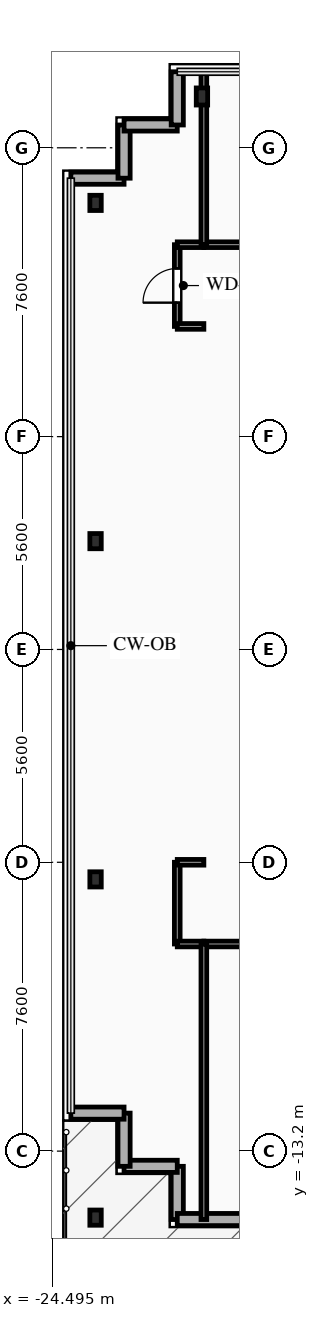
"""IFC4 building model, lengths in metres.
Left out: names, types, materials, properties, quantities, classifications, styles, units other than length and angle.
Written with IfcOpenShell. Run it as: python <this file> out.ifc"""

import sys

from ifc_helpers import new_model, si_unit, direction, frame, frame_2d, origin, origin_2d, place, context, subcontext, project, spatial, rectangle, i_section, extrude, element, fill, save


model = new_model("IFC4")
c1 = context("Model", 3, precision=1e-05, world=origin(), true_north=direction((0.0, 1.0)))
c2 = subcontext(c1, "Body", "Model", "MODEL_VIEW")
j1 = project(units=[si_unit("LENGTHUNIT", "METRE"), si_unit("PLANEANGLEUNIT", "RADIAN")], contexts=[c1])
p1 = place(None, origin())
s1 = spatial("IfcSite", under=j1, at=p1, CompositionType="ELEMENT")
p2 = place(p1, origin())
s2 = spatial("IfcBuilding", under=s1, at=p2, CompositionType="ELEMENT")
p3 = place(p2, frame((0.0, 0.0, 261.8)))
s3 = spatial("IfcBuildingStorey", under=s2, at=p3, CompositionType="ELEMENT", Elevation=261.8)
p4 = place(p3, frame((-20.55, 14.55, 0.0), z_axis=(0.0, 0.0, 1.0), x_axis=(1.0, 0.0, 0.0)))
e1 = element("IfcColumn", 1, at=p4, inside=s3, PredefinedType="COLUMN", context=c2, shape_type="SweptSolid", body=[
    extrude(i_section(OverallWidth=0.3, OverallDepth=0.45, WebThickness=0.014, FlangeThickness=0.026, FilletRadius=0.027, at=origin_2d()), origin(), (0.0, 0.0, 1.0), 4.2),
])
for number, where, z_axis, x_axis in (
    (2, (-23.35, 11.75, 0.0), (0.0, 0.0, 1.0), (1.0, 0.0, 0.0)),
    (3, (-23.35, 2.85, 0.0), (0.0, 0.0, 1.0), (1.0, 0.0, 0.0)),
    (4, (-23.35, -6.05, 0.0), (0.0, 0.0, 1.0), (1.0, 0.0, 0.0)),
    (5, (-23.35, -14.95, 0.0), (0.0, 0.0, 1.0), (1.0, 0.0, 0.0)),
):
    element("IfcColumn", number, at=place(p3, frame(where, z_axis=z_axis, x_axis=x_axis)), inside=s3, PredefinedType="COLUMN", context=c2, shape_type="SweptSolid", body=[
        extrude(i_section(OverallWidth=0.3, OverallDepth=0.4, WebThickness=0.013, FlangeThickness=0.024, FilletRadius=0.027, at=origin_2d()), origin(), (0.0, 0.0, 1.0), 4.2),
    ])
p5 = place(p3, frame((-21.2, -15.0, 0.0), z_axis=(0.0, 0.0, 1.0), x_axis=(0.0, 1.0, 0.0)))
e6 = element("IfcWall", 6, at=p5, inside=s3, PredefinedType="SOLIDWALL", context=c2, shape_type="SweptSolid", body=[
    extrude(rectangle(XDim=1.4, YDim=0.32, at=frame_2d((0.7, 0.0))), origin(), (0.0, 0.0, 1.0), 3.78),
])
for number, where, z_axis, x_axis in (
    (7, (-21.2, -13.6, 0.0), (0.0, 0.0, 1.0), (-1.0, 0.0, 0.0)),
    (8, (-22.6, -13.6, 0.0), (0.0, 0.0, 1.0), (0.0, 1.0, 0.0)),
):
    element("IfcWall", number, at=place(p3, frame(where, z_axis=z_axis, x_axis=x_axis)), inside=s3, PredefinedType="SOLIDWALL", context=c2, shape_type="SweptSolid", body=[
        extrude(rectangle(XDim=1.4, YDim=0.32, at=frame_2d((0.7, 0.0))), origin(), (0.0, 0.0, 1.0), 3.78),
    ])
for number, where, z_axis, x_axis in (
    (9, (-22.6, -12.2, 0.0), (0.0, 0.0, 1.0), (-1.0, 0.0, 0.0)),
    (10, (-24.0, 12.4, 0.0), (0.0, 0.0, 1.0), (1.0, 0.0, 0.0)),
):
    element("IfcWall", number, at=place(p3, frame(where, z_axis=z_axis, x_axis=x_axis)), inside=s3, PredefinedType="SOLIDWALL", context=c2, shape_type="SweptSolid", body=[
        extrude(rectangle(XDim=1.4, YDim=0.32, at=frame_2d((0.7, 0.0))), origin(), (0.0, 0.0, 1.0), 3.78),
    ])
for number, where, z_axis, x_axis in (
    (11, (-22.6, 12.4, 0.0), (0.0, 0.0, 1.0), (0.0, 1.0, 0.0)),
    (12, (-22.6, 13.8, 0.0), (0.0, 0.0, 1.0), (1.0, 0.0, 0.0)),
):
    element("IfcWall", number, at=place(p3, frame(where, z_axis=z_axis, x_axis=x_axis)), inside=s3, PredefinedType="SOLIDWALL", context=c2, shape_type="SweptSolid", body=[
        extrude(rectangle(XDim=1.4, YDim=0.32, at=frame_2d((0.7, 0.0))), origin(), (0.0, 0.0, 1.0), 3.78),
    ])
p6 = place(p3, frame((-21.2, 13.8, 0.0), z_axis=(0.0, 0.0, 1.0), x_axis=(0.0, 1.0, 0.0)))
e13 = element("IfcWall", 13, at=p6, inside=s3, PredefinedType="SOLIDWALL", context=c2, shape_type="SweptSolid", body=[
    extrude(rectangle(XDim=1.4, YDim=0.32, at=frame_2d((0.7, 0.0))), origin(), (0.0, 0.0, 1.0), 3.78),
])
p7 = place(p3, frame((20.8, -15.0, 0.0), z_axis=(0.0, 0.0, 1.0), x_axis=(-1.0, 0.0, 0.0)))
e14 = element("IfcWall", 14, at=p7, inside=s3, PredefinedType="SOLIDWALL", context=c2, shape_type="SweptSolid", body=[
    extrude(rectangle(XDim=42.0, YDim=0.32, at=frame_2d((21.0, 0.0))), origin(), (0.0, 0.0, 1.0), 3.78),
])
p8 = place(p7, frame((0.75, 0.0, 0.0)))
e15 = element("IfcOpeningElement", 15, at=p8, cuts=e14, PredefinedType="OPENING", context=c2, shape_type="SweptSolid", body=[
    extrude(rectangle(XDim=1.5, YDim=2.2, at=frame_2d((0.75, 1.1))), frame((0.0, 0.17, 0.0), z_axis=(0.0, -1.0, 0.0), x_axis=(1.0, 0.0, 0.0)), (0.0, 0.0, 1.0), 0.34),
])
p9 = place(p7, frame((4.11, 0.0, 0.75)))
e16 = element("IfcOpeningElement", 16, at=p9, cuts=e14, PredefinedType="OPENING", context=c2, shape_type="SweptSolid", body=[
    extrude(rectangle(XDim=2.1, YDim=2.3, at=frame_2d((1.05, 1.15))), frame((0.0, 0.17, 0.0), z_axis=(0.0, -1.0, 0.0), x_axis=(1.0, 0.0, 0.0)), (0.0, 0.0, 1.0), 0.34),
])
p10 = place(p7, frame((19.79, 0.0, 0.75)))
e17 = element("IfcOpeningElement", 17, at=p10, cuts=e14, PredefinedType="OPENING", context=c2, shape_type="SweptSolid", body=[
    extrude(rectangle(XDim=2.1, YDim=2.3, at=frame_2d((1.05, 1.15))), frame((0.0, 0.17, 0.0), z_axis=(0.0, -1.0, 0.0), x_axis=(1.0, 0.0, 0.0)), (0.0, 0.0, 1.0), 0.34),
])
p11 = place(p7, frame((35.55, 0.0, 0.75)))
e18 = element("IfcOpeningElement", 18, at=p11, cuts=e14, PredefinedType="OPENING", context=c2, shape_type="SweptSolid", body=[
    extrude(rectangle(XDim=2.1, YDim=2.3, at=frame_2d((1.05, 1.15))), frame((0.0, 0.17, 0.0), z_axis=(0.0, -1.0, 0.0), x_axis=(1.0, 0.0, 0.0)), (0.0, 0.0, 1.0), 0.34),
])
p12 = place(p3, frame((-21.2, 8.5, 0.0), z_axis=(0.0, 0.0, 1.0), x_axis=(0.0, 1.0, 0.0)))
e19 = element("IfcWall", 19, at=p12, inside=s3, PredefinedType="PARTITIONING", context=c2, shape_type="SweptSolid", body=[
    extrude(rectangle(XDim=2.15, YDim=0.15, at=frame_2d((1.075, 0.0))), origin(), (0.0, 0.0, 1.0), 3.435),
])
p13 = place(p12, frame((0.625, 0.0, 0.0)))
e20 = element("IfcOpeningElement", 20, at=p13, cuts=e19, PredefinedType="OPENING", context=c2, shape_type="SweptSolid", body=[
    extrude(rectangle(XDim=0.9, YDim=2.1, at=frame_2d((0.45, 1.05))), frame((0.0, 0.085, 0.0), z_axis=(0.0, -1.0, 0.0), x_axis=(1.0, 0.0, 0.0)), (0.0, 0.0, 1.0), 0.17),
])
for number, where, z_axis, x_axis in (
    (21, (-20.5, 8.5, 0.0), (0.0, 0.0, 1.0), (-1.0, 0.0, 0.0)),
    (22, (-21.2, 10.65, 0.0), (0.0, 0.0, 1.0), (1.0, 0.0, 0.0)),
):
    element("IfcWall", number, at=place(p3, frame(where, z_axis=z_axis, x_axis=x_axis)), inside=s3, PredefinedType="PARTITIONING", context=c2, shape_type="SweptSolid", body=[
        extrude(rectangle(XDim=0.7, YDim=0.15, at=frame_2d((0.35, 0.0))), origin(), (0.0, 0.0, 1.0), 3.78),
    ])
p14 = place(p3, frame((-20.5, 10.65, 0.0), z_axis=(0.0, 0.0, 1.0), x_axis=(1.0, 0.0, 0.0)))
e23 = element("IfcWall", 23, at=p14, inside=s3, PredefinedType="PARTITIONING", context=c2, shape_type="SweptSolid", body=[
    extrude(rectangle(XDim=20.5, YDim=0.15, at=frame_2d((10.25, 0.0))), origin(), (0.0, 0.0, 1.0), 3.78),
])
p15 = place(p14, frame((16.584, 0.0, 0.0)))
e24 = element("IfcOpeningElement", 24, at=p15, cuts=e23, PredefinedType="OPENING", context=c2, shape_type="SweptSolid", body=[
    extrude(rectangle(XDim=1.05, YDim=2.15, at=frame_2d((0.525, 1.075))), frame((0.0, 0.085, 0.0), z_axis=(0.0, -1.0, 0.0), x_axis=(1.0, 0.0, 0.0)), (0.0, 0.0, 1.0), 0.17),
])
p16 = place(p3, frame((-11.0, -7.75, 0.0), z_axis=(0.0, 0.0, 1.0), x_axis=(-1.0, 0.0, 0.0)))
e25 = element("IfcWall", 25, at=p16, inside=s3, PredefinedType="PARTITIONING", context=c2, shape_type="SweptSolid", body=[
    extrude(rectangle(XDim=9.5, YDim=0.15, at=frame_2d((4.75, 0.0))), origin(), (0.0, 0.0, 1.0), 3.78),
])
p17 = place(p16, frame((2.403, 0.0, 0.0)))
e26 = element("IfcOpeningElement", 26, at=p17, cuts=e25, PredefinedType="OPENING", context=c2, shape_type="SweptSolid", body=[
    extrude(rectangle(XDim=1.05, YDim=2.15, at=frame_2d((0.525, 1.075))), frame((0.0, 0.085, 0.0), z_axis=(0.0, -1.0, 0.0), x_axis=(1.0, 0.0, 0.0)), (0.0, 0.0, 1.0), 0.17),
])
p18 = place(p3, frame((-21.2, -7.75, 0.0), z_axis=(0.0, 0.0, 1.0), x_axis=(0.0, 1.0, 0.0)))
e27 = element("IfcWall", 27, at=p18, inside=s3, PredefinedType="PARTITIONING", context=c2, shape_type="SweptSolid", body=[
    extrude(rectangle(XDim=2.15, YDim=0.15, at=frame_2d((1.075, 0.0))), origin(), (0.0, 0.0, 1.0), 3.435),
])
for number, where, z_axis, x_axis in (
    (28, (-20.5, -7.75, 0.0), (0.0, 0.0, 1.0), (-1.0, 0.0, 0.0)),
    (29, (-21.2, -5.6, 0.0), (0.0, 0.0, 1.0), (1.0, 0.0, 0.0)),
):
    element("IfcWall", number, at=place(p3, frame(where, z_axis=z_axis, x_axis=x_axis)), inside=s3, PredefinedType="PARTITIONING", context=c2, shape_type="SweptSolid", body=[
        extrude(rectangle(XDim=0.7, YDim=0.15, at=frame_2d((0.35, 0.0))), origin(), (0.0, 0.0, 1.0), 3.78),
    ])
p19 = place(p3, frame((-20.5, -15.0, 0.0), z_axis=(0.0, 0.0, 1.0), x_axis=(0.0, 1.0, 0.0)))
e30 = element("IfcWall", 30, at=p19, inside=s3, PredefinedType="PARTITIONING", context=c2, shape_type="SweptSolid", body=[
    extrude(rectangle(XDim=7.25, YDim=0.15, at=frame_2d((3.625, 0.0))), origin(), (0.0, 0.0, 1.0), 3.78),
])
p20 = place(p3, frame((-20.5, 15.2, 0.0), z_axis=(0.0, 0.0, 1.0), x_axis=(0.0, -1.0, 0.0)))
e31 = element("IfcWall", 31, at=p20, inside=s3, PredefinedType="PARTITIONING", context=c2, shape_type="SweptSolid", body=[
    extrude(rectangle(XDim=4.55, YDim=0.15, at=frame_2d((2.275, 0.0))), origin(), (0.0, 0.0, 1.0), 3.405),
])
p21 = place(p13, origin())
e32 = element("IfcDoor", 32, at=p21, inside=s3, OperationType="SINGLE_SWING_LEFT", PredefinedType="DOOR", context=c2, shape_type="SweptSolid", body=[
    extrude(rectangle(XDim=0.9, YDim=2.1, at=frame_2d((0.45, 1.05))), frame((0.0, 0.025, 0.0), z_axis=(0.0, -1.0, 0.0), x_axis=(1.0, 0.0, 0.0)), (0.0, 0.0, 1.0), 0.05),
])
fill(e20, e32)
save(model, sys.argv[1])
